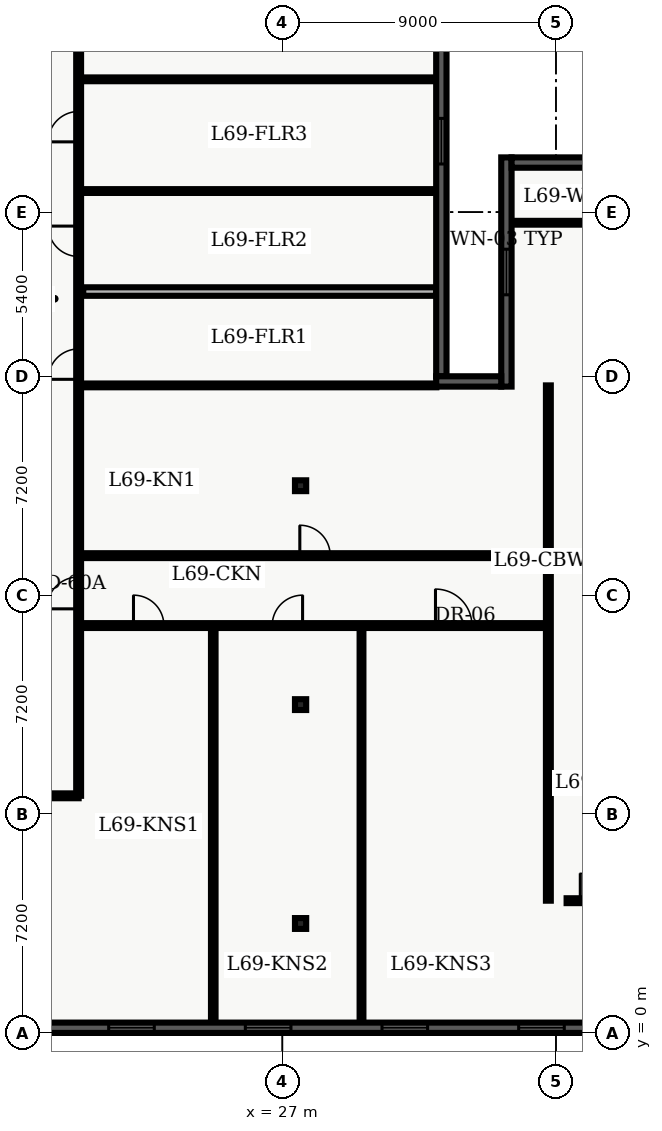
"""IFC4 building model, lengths in metres.
Left out: names, types, materials, properties, quantities, classifications, styles, units other than length and angle.
Written with IfcOpenShell. Run it as: python <this file> out.ifc"""

import sys

from ifc_helpers import new_model, entity, si_unit, converted_unit, direction, frame, origin_with_axes, origin_2d_with_axis, place, context, subcontext, project, spatial, polyline, rectangle, i_section, outline, extrude, element, fill, save


model = new_model("IFC4")
c1 = context("Model", 3, precision=1e-05, world=origin_with_axes(), true_north=direction((0.0, 1.0)))
c2 = subcontext(c1, "Body", "Model", "MODEL_VIEW")
j1 = project(units=[si_unit("LENGTHUNIT", "METRE"), converted_unit("PLANEANGLEUNIT", "DEGREE", entity("IfcPlaneAngleMeasure", 0.017), si_unit("PLANEANGLEUNIT", "RADIAN"), dimensions=[0, 0, 0, 0, 0, 0, 0])], contexts=[c1])
p1 = place(None, origin_with_axes())
s1 = spatial("IfcSite", under=j1, at=p1, CompositionType="ELEMENT")
p2 = place(p1, origin_with_axes())
s2 = spatial("IfcBuilding", under=s1, at=p2, CompositionType="ELEMENT")
p3 = place(p2, frame((0.0, 0.0, 280.2), z_axis=(0.0, 0.0, 1.0), x_axis=(1.0, 0.0, 0.0)))
s3 = spatial("IfcBuildingStorey", under=s2, at=p3, CompositionType="ELEMENT", Elevation=280.2)
for number, where, z_axis, x_axis in (
    (1, (27.6, 3.6, 0.0), (0.0, 0.0, 1.0), (1.0, 0.0, 0.0)),
    (2, (27.6, 10.8, 0.0), (0.0, 0.0, 1.0), (1.0, 0.0, 0.0)),
    (3, (27.6, 18.0, 0.0), (0.0, 0.0, 1.0), (1.0, 0.0, 0.0)),
):
    element("IfcColumn", number, at=place(p3, frame(where, z_axis=z_axis, x_axis=x_axis)), inside=s3, PredefinedType="COLUMN", context=c2, shape_type="SweptSolid", body=[
        extrude(i_section(OverallWidth=0.369, OverallDepth=0.356, WebThickness=0.011, FlangeThickness=0.018, FilletRadius=0.018, at=origin_2d_with_axis()), origin_with_axes(), (0.0, 0.0, 1.0), 3.9),
    ])
p4 = place(p3, frame((8.135, 7.8, 0.0), z_axis=(0.0, 0.0, 1.0), x_axis=(1.0, 0.0, 0.0)))
e4 = element("IfcWall", 4, at=p4, inside=s3, PredefinedType="PARTITIONING", context=c2, shape_type="SweptSolid", body=[
    extrude(outline(polyline([(0.0, -0.08), (12.165, -0.08), (12.165, 0.08), (0.0, 0.08), (0.0, -0.08)])), origin_with_axes(), (0.0, 0.0, 1.0), 2.7),
])
p5 = place(p4, frame((6.065, 0.0, 0.0), z_axis=(0.0, 0.0, 1.0), x_axis=(1.0, 0.0, 0.0)))
e5 = element("IfcOpeningElement", 5, at=p5, cuts=e4, PredefinedType="OPENING", context=c2, shape_type="SweptSolid", body=[
    extrude(rectangle(XDim=1.0, YDim=0.18, at=origin_2d_with_axis()), origin_with_axes(), (0.0, 0.0, 1.0), 2.15),
])
p6 = place(p3, frame((20.3, 7.8, 0.0), z_axis=(0.0, 0.0, 1.0), x_axis=(0.0, 1.0, 0.0)))
e6 = element("IfcWall", 6, at=p6, inside=s3, PredefinedType="PARTITIONING", context=c2, shape_type="SweptSolid", body=[
    extrude(outline(polyline([(0.0, -0.08), (32.7, -0.08), (32.7, 0.08), (0.0, 0.08), (0.0, -0.08)])), origin_with_axes(), (0.0, 0.0, 1.0), 2.7),
])
p7 = place(p6, frame((14.2, 0.0, 0.0), z_axis=(0.0, 0.0, 1.0), x_axis=(1.0, 0.0, 0.0)))
e7 = element("IfcOpeningElement", 7, at=p7, cuts=e6, PredefinedType="OPENING", context=c2, shape_type="SweptSolid", body=[
    extrude(rectangle(XDim=1.0, YDim=0.18, at=origin_2d_with_axis()), origin_with_axes(), (0.0, 0.0, 1.0), 2.15),
])
p8 = place(p6, frame((18.24, 0.0, 0.0), z_axis=(0.0, 0.0, 1.0), x_axis=(1.0, 0.0, 0.0)))
e8 = element("IfcOpeningElement", 8, at=p8, cuts=e6, PredefinedType="OPENING", context=c2, shape_type="SweptSolid", body=[
    extrude(rectangle(XDim=1.0, YDim=0.18, at=origin_2d_with_axis()), origin_with_axes(), (0.0, 0.0, 1.0), 2.15),
])
p9 = place(p6, frame((22.011, 0.0, 0.0), z_axis=(0.0, 0.0, 1.0), x_axis=(1.0, 0.0, 0.0)))
e9 = element("IfcOpeningElement", 9, at=p9, cuts=e6, PredefinedType="OPENING", context=c2, shape_type="SweptSolid", body=[
    extrude(rectangle(XDim=1.0, YDim=0.18, at=origin_2d_with_axis()), origin_with_axes(), (0.0, 0.0, 1.0), 2.15),
])
p10 = place(p6, frame((25.672, 0.0, 0.0), z_axis=(0.0, 0.0, 1.0), x_axis=(1.0, 0.0, 0.0)))
e10 = element("IfcOpeningElement", 10, at=p10, cuts=e6, PredefinedType="OPENING", context=c2, shape_type="SweptSolid", body=[
    extrude(rectangle(XDim=1.0, YDim=0.18, at=origin_2d_with_axis()), origin_with_axes(), (0.0, 0.0, 1.0), 2.15),
])
p11 = place(p6, frame((6.675, 0.0, 0.0), z_axis=(0.0, 0.0, 1.0), x_axis=(1.0, 0.0, 0.0)))
e11 = element("IfcOpeningElement", 11, at=p11, cuts=e6, PredefinedType="OPENING", context=c2, shape_type="SweptSolid", body=[
    extrude(rectangle(XDim=1.05, YDim=0.18, at=origin_2d_with_axis()), origin_with_axes(), (0.0, 0.0, 1.0), 2.15),
])
p12 = place(p3, frame((20.45, 24.387, 0.0), z_axis=(0.0, 0.0, 1.0), x_axis=(1.0, 0.0, 0.0)))
e12 = element("IfcWall", 12, at=p12, inside=s3, PredefinedType="PARTITIONING", context=c2, shape_type="SweptSolid", body=[
    extrude(outline(polyline([(0.0, -0.14), (11.615, -0.14), (11.615, 0.14), (0.0, 0.14), (0.0, -0.14)])), origin_with_axes(), (0.0, 0.0, 1.0), 2.7),
])
for number, where, z_axis, x_axis in (
    (13, (20.45, 27.693, 0.0), (0.0, 0.0, 1.0), (1.0, 0.0, 0.0)),
    (14, (20.45, 31.368, 0.0), (0.0, 0.0, 1.0), (1.0, 0.0, 0.0)),
):
    element("IfcWall", number, at=place(p3, frame(where, z_axis=z_axis, x_axis=x_axis)), inside=s3, PredefinedType="PARTITIONING", context=c2, shape_type="SweptSolid", body=[
        extrude(outline(polyline([(0.0, -0.062), (11.615, -0.062), (11.615, 0.062), (0.0, 0.062), (0.0, -0.062)])), origin_with_axes(), (0.0, 0.0, 1.0), 2.7),
    ])
p13 = place(p3, frame((20.3, 13.4, 0.0), z_axis=(0.0, 0.0, 1.0), x_axis=(1.0, 0.0, 0.0)))
e15 = element("IfcWall", 15, at=p13, inside=s3, PredefinedType="PARTITIONING", context=c2, shape_type="SweptSolid", body=[
    extrude(outline(polyline([(0.0, -0.08), (15.45, -0.08), (15.45, 0.08), (0.0, 0.08), (0.0, -0.08)])), origin_with_axes(), (0.0, 0.0, 1.0), 2.7),
])
p14 = place(p13, frame((2.304, 0.0, 0.0), z_axis=(0.0, 0.0, 1.0), x_axis=(1.0, 0.0, 0.0)))
e16 = element("IfcOpeningElement", 16, at=p14, cuts=e15, PredefinedType="OPENING", context=c2, shape_type="SweptSolid", body=[
    extrude(rectangle(XDim=1.0, YDim=0.18, at=origin_2d_with_axis()), origin_with_axes(), (0.0, 0.0, 1.0), 2.15),
])
p15 = place(p13, frame((6.866, 0.0, 0.0), z_axis=(0.0, 0.0, 1.0), x_axis=(1.0, 0.0, 0.0)))
e17 = element("IfcOpeningElement", 17, at=p15, cuts=e15, PredefinedType="OPENING", context=c2, shape_type="SweptSolid", body=[
    extrude(rectangle(XDim=1.0, YDim=0.18, at=origin_2d_with_axis()), origin_with_axes(), (0.0, 0.0, 1.0), 2.15),
])
p16 = place(p13, frame((12.337, 0.0, 0.0), z_axis=(0.0, 0.0, 1.0), x_axis=(1.0, 0.0, 0.0)))
e18 = element("IfcOpeningElement", 18, at=p16, cuts=e15, PredefinedType="OPENING", context=c2, shape_type="SweptSolid", body=[
    extrude(rectangle(XDim=1.2, YDim=0.18, at=origin_2d_with_axis()), origin_with_axes(), (0.0, 0.0, 1.0), 2.2),
])
p17 = place(p3, frame((20.3, 15.7, 0.0), z_axis=(0.0, 0.0, 1.0), x_axis=(1.0, 0.0, 0.0)))
e19 = element("IfcWall", 19, at=p17, inside=s3, PredefinedType="PARTITIONING", context=c2, shape_type="SweptSolid", body=[
    extrude(outline(polyline([(0.0, -0.08), (15.45, -0.08), (15.45, 0.08), (0.0, 0.08), (0.0, -0.08)])), origin_with_axes(), (0.0, 0.0, 1.0), 2.7),
])
p18 = place(p17, frame((7.775, 0.0, 0.0), z_axis=(0.0, 0.0, 1.0), x_axis=(1.0, 0.0, 0.0)))
e20 = element("IfcOpeningElement", 20, at=p18, cuts=e19, PredefinedType="OPENING", context=c2, shape_type="SweptSolid", body=[
    extrude(rectangle(XDim=1.0, YDim=0.18, at=origin_2d_with_axis()), origin_with_axes(), (0.0, 0.0, 1.0), 2.15),
])
p19 = place(p3, frame((35.75, 4.35, 0.0), z_axis=(0.0, 0.0, 1.0), x_axis=(0.0, 1.0, 0.0)))
e21 = element("IfcWall", 21, at=p19, inside=s3, PredefinedType="PARTITIONING", context=c2, shape_type="SweptSolid", body=[
    extrude(outline(polyline([(0.0, -0.08), (16.95, -0.08), (16.95, 0.08), (0.0, 0.08), (0.0, -0.08)])), origin_with_axes(), (0.0, 0.0, 1.0), 2.7),
])
p20 = place(p3, frame((24.728, 0.335, 0.0), z_axis=(0.0, 0.0, 1.0), x_axis=(0.0, 1.0, 0.0)))
e22 = element("IfcWall", 22, at=p20, inside=s3, PredefinedType="PARTITIONING", context=c2, shape_type="SweptSolid", body=[
    extrude(outline(polyline([(0.0, -0.075), (12.945, -0.075), (12.945, 0.075), (0.0, 0.075), (0.0, -0.075)])), origin_with_axes(), (0.0, 0.0, 1.0), 2.7),
])
p21 = place(p3, frame((29.604, 0.335, 0.0), z_axis=(0.0, 0.0, 1.0), x_axis=(0.0, 1.0, 0.0)))
e23 = element("IfcWall", 23, at=p21, inside=s3, PredefinedType="PARTITIONING", context=c2, shape_type="SweptSolid", body=[
    extrude(outline(polyline([(0.0, -0.062), (12.945, -0.062), (12.945, 0.062), (0.0, 0.062), (0.0, -0.062)])), origin_with_axes(), (0.0, 0.0, 1.0), 2.7),
])
p22 = place(p3, frame((34.535, 26.65, 0.0), z_axis=(0.0, 0.0, 1.0), x_axis=(1.0, 0.0, 0.0)))
e24 = element("IfcWall", 24, at=p22, inside=s3, PredefinedType="PARTITIONING", context=c2, shape_type="SweptSolid", body=[
    extrude(outline(polyline([(0.0, -0.062), (12.995, -0.062), (12.995, 0.062), (0.0, 0.062), (0.0, -0.062)])), origin_with_axes(), (0.0, 0.0, 1.0), 2.7),
])
p23 = place(p22, frame((8.465, 0.0, 0.0), z_axis=(0.0, 0.0, 1.0), x_axis=(1.0, 0.0, 0.0)))
e25 = element("IfcOpeningElement", 25, at=p23, cuts=e24, PredefinedType="OPENING", context=c2, shape_type="SweptSolid", body=[
    extrude(rectangle(XDim=1.0, YDim=0.145, at=origin_2d_with_axis()), origin_with_axes(), (0.0, 0.0, 1.0), 2.15),
])
p24 = place(p3, frame((20.3, 21.3, 0.0), z_axis=(0.0, 0.0, 1.0), x_axis=(1.0, 0.0, 0.0)))
e26 = element("IfcWall", 26, at=p24, inside=s3, PredefinedType="PARTITIONING", context=c2, shape_type="SweptSolid", body=[
    extrude(outline(polyline([(0.0, -0.062), (11.765, -0.062), (11.765, 0.062), (0.0, 0.062), (0.0, -0.062)])), origin_with_axes(), (0.0, 0.0, 1.0), 2.7),
])
p25 = place(p3, frame((36.35, 4.35, 0.0), z_axis=(0.0, 0.0, 1.0), x_axis=(1.0, 0.0, 0.0)))
e27 = element("IfcWall", 27, at=p25, inside=s3, PredefinedType="PARTITIONING", context=c2, shape_type="SweptSolid", body=[
    extrude(outline(polyline([(0.0, -0.08), (3.725, -0.08), (3.725, 0.08), (0.0, 0.08), (0.0, -0.08)])), origin_with_axes(), (0.0, 0.0, 1.0), 2.7),
])
p26 = place(p25, frame((0.9, 0.0, 0.0), z_axis=(0.0, 0.0, 1.0), x_axis=(1.0, 0.0, 0.0)))
e28 = element("IfcOpeningElement", 28, at=p26, cuts=e27, PredefinedType="OPENING", context=c2, shape_type="SweptSolid", body=[
    extrude(rectangle(XDim=0.9, YDim=0.18, at=origin_2d_with_axis()), origin_with_axes(), (0.0, 0.0, 1.0), 2.15),
])
p27 = place(p3, frame((34.37, 21.26, 0.0), z_axis=(0.0, 0.0, 1.0), x_axis=(0.0, 1.0, 0.0)))
e29 = element("IfcWall", 29, at=p27, inside=s3, PredefinedType="SOLIDWALL", context=c2, shape_type="SweptSolid", body=[
    extrude(outline(polyline([(0.0, -0.17), (7.54, -0.17), (7.54, 0.17), (0.0, 0.17), (0.0, -0.17)])), origin_with_axes(), (0.0, 0.0, 1.0), 3.66),
])
p28 = place(p27, frame((3.77, 0.0, 0.45), z_axis=(0.0, 0.0, 1.0), x_axis=(1.0, 0.0, 0.0)))
e30 = element("IfcOpeningElement", 30, at=p28, cuts=e29, PredefinedType="OPENING", context=c2, shape_type="SweptSolid", body=[
    extrude(rectangle(XDim=1.5, YDim=0.36, at=origin_2d_with_axis()), origin_with_axes(), (0.0, 0.0, 1.0), 2.1),
])
p29 = place(p3, frame((34.54, 28.63, 0.0), z_axis=(0.0, 0.0, 1.0), x_axis=(1.0, 0.0, 0.0)))
e31 = element("IfcWall", 31, at=p29, inside=s3, PredefinedType="SOLIDWALL", context=c2, shape_type="SweptSolid", body=[
    extrude(outline(polyline([(0.0, -0.17), (13.16, -0.17), (13.16, 0.17), (0.0, 0.17), (0.0, -0.17)])), origin_with_axes(), (0.0, 0.0, 1.0), 3.66),
])
p30 = place(p29, frame((3.59, 0.0, 0.45), z_axis=(0.0, 0.0, 1.0), x_axis=(1.0, 0.0, 0.0)))
e32 = element("IfcOpeningElement", 32, at=p30, cuts=e31, PredefinedType="OPENING", context=c2, shape_type="SweptSolid", body=[
    extrude(rectangle(XDim=1.5, YDim=0.36, at=origin_2d_with_axis()), origin_with_axes(), (0.0, 0.0, 1.0), 2.1),
])
p31 = place(p29, frame((9.57, 0.0, 0.45), z_axis=(0.0, 0.0, 1.0), x_axis=(1.0, 0.0, 0.0)))
e33 = element("IfcOpeningElement", 33, at=p31, cuts=e31, PredefinedType="OPENING", context=c2, shape_type="SweptSolid", body=[
    extrude(rectangle(XDim=1.5, YDim=0.36, at=origin_2d_with_axis()), origin_with_axes(), (0.0, 0.0, 1.0), 2.1),
])
p32 = place(p3, frame((47.36, 0.17, 0.0), z_axis=(0.0, 0.0, 1.0), x_axis=(-1.0, 0.0, 0.0)))
e34 = element("IfcWall", 34, at=p32, inside=s3, PredefinedType="SOLIDWALL", context=c2, shape_type="SweptSolid", body=[
    extrude(outline(polyline([(0.0, -0.17), (37.16, -0.17), (37.16, 0.17), (0.0, 0.17), (0.0, -0.17)])), origin_with_axes(), (0.0, 0.0, 1.0), 3.66),
])
p33 = place(p32, frame((2.847, 0.0, 0.45), z_axis=(0.0, 0.0, 1.0), x_axis=(1.0, 0.0, 0.0)))
e35 = element("IfcOpeningElement", 35, at=p33, cuts=e34, PredefinedType="OPENING", context=c2, shape_type="SweptSolid", body=[
    extrude(rectangle(XDim=1.5, YDim=0.36, at=origin_2d_with_axis()), origin_with_axes(), (0.0, 0.0, 1.0), 2.1),
])
p34 = place(p32, frame((7.342, 0.0, 0.45), z_axis=(0.0, 0.0, 1.0), x_axis=(1.0, 0.0, 0.0)))
e36 = element("IfcOpeningElement", 36, at=p34, cuts=e34, PredefinedType="OPENING", context=c2, shape_type="SweptSolid", body=[
    extrude(rectangle(XDim=1.5, YDim=0.36, at=origin_2d_with_axis()), origin_with_axes(), (0.0, 0.0, 1.0), 2.1),
])
p35 = place(p32, frame((11.837, 0.0, 0.45), z_axis=(0.0, 0.0, 1.0), x_axis=(1.0, 0.0, 0.0)))
e37 = element("IfcOpeningElement", 37, at=p35, cuts=e34, PredefinedType="OPENING", context=c2, shape_type="SweptSolid", body=[
    extrude(rectangle(XDim=1.5, YDim=0.36, at=origin_2d_with_axis()), origin_with_axes(), (0.0, 0.0, 1.0), 2.1),
])
p36 = place(p32, frame((16.332, 0.0, 0.45), z_axis=(0.0, 0.0, 1.0), x_axis=(1.0, 0.0, 0.0)))
e38 = element("IfcOpeningElement", 38, at=p36, cuts=e34, PredefinedType="OPENING", context=c2, shape_type="SweptSolid", body=[
    extrude(rectangle(XDim=1.5, YDim=0.36, at=origin_2d_with_axis()), origin_with_axes(), (0.0, 0.0, 1.0), 2.1),
])
p37 = place(p32, frame((20.827, 0.0, 0.45), z_axis=(0.0, 0.0, 1.0), x_axis=(1.0, 0.0, 0.0)))
e39 = element("IfcOpeningElement", 39, at=p37, cuts=e34, PredefinedType="OPENING", context=c2, shape_type="SweptSolid", body=[
    extrude(rectangle(XDim=1.5, YDim=0.36, at=origin_2d_with_axis()), origin_with_axes(), (0.0, 0.0, 1.0), 2.1),
])
p38 = place(p32, frame((25.322, 0.0, 0.45), z_axis=(0.0, 0.0, 1.0), x_axis=(1.0, 0.0, 0.0)))
e40 = element("IfcOpeningElement", 40, at=p38, cuts=e34, PredefinedType="OPENING", context=c2, shape_type="SweptSolid", body=[
    extrude(rectangle(XDim=1.5, YDim=0.36, at=origin_2d_with_axis()), origin_with_axes(), (0.0, 0.0, 1.0), 2.1),
])
p39 = place(p32, frame((29.817, 0.0, 0.45), z_axis=(0.0, 0.0, 1.0), x_axis=(1.0, 0.0, 0.0)))
e41 = element("IfcOpeningElement", 41, at=p39, cuts=e34, PredefinedType="OPENING", context=c2, shape_type="SweptSolid", body=[
    extrude(rectangle(XDim=1.5, YDim=0.36, at=origin_2d_with_axis()), origin_with_axes(), (0.0, 0.0, 1.0), 2.1),
])
p40 = place(p32, frame((34.312, 0.0, 0.45), z_axis=(0.0, 0.0, 1.0), x_axis=(1.0, 0.0, 0.0)))
e42 = element("IfcOpeningElement", 42, at=p40, cuts=e34, PredefinedType="OPENING", context=c2, shape_type="SweptSolid", body=[
    extrude(rectangle(XDim=1.5, YDim=0.36, at=origin_2d_with_axis()), origin_with_axes(), (0.0, 0.0, 1.0), 2.1),
])
p41 = place(p3, frame((32.23, 41.82, 0.0), z_axis=(0.0, 0.0, 1.0), x_axis=(0.0, -1.0, 0.0)))
e43 = element("IfcWall", 43, at=p41, inside=s3, PredefinedType="SOLIDWALL", context=c2, shape_type="SweptSolid", body=[
    extrude(outline(polyline([(0.0, -0.17), (20.22, -0.17), (20.22, 0.17), (0.0, 0.17), (0.0, -0.17)])), origin_with_axes(), (0.0, 0.0, 1.0), 3.66),
])
p42 = place(p41, frame((2.978, 0.0, 0.45), z_axis=(0.0, 0.0, 1.0), x_axis=(1.0, 0.0, 0.0)))
e44 = element("IfcOpeningElement", 44, at=p42, cuts=e43, PredefinedType="OPENING", context=c2, shape_type="SweptSolid", body=[
    extrude(rectangle(XDim=1.5, YDim=0.36, at=origin_2d_with_axis()), origin_with_axes(), (0.0, 0.0, 1.0), 2.1),
])
p43 = place(p41, frame((7.732, 0.0, 0.45), z_axis=(0.0, 0.0, 1.0), x_axis=(1.0, 0.0, 0.0)))
e45 = element("IfcOpeningElement", 45, at=p43, cuts=e43, PredefinedType="OPENING", context=c2, shape_type="SweptSolid", body=[
    extrude(rectangle(XDim=1.5, YDim=0.36, at=origin_2d_with_axis()), origin_with_axes(), (0.0, 0.0, 1.0), 2.1),
])
p44 = place(p41, frame((12.487, 0.0, 0.45), z_axis=(0.0, 0.0, 1.0), x_axis=(1.0, 0.0, 0.0)))
e46 = element("IfcOpeningElement", 46, at=p44, cuts=e43, PredefinedType="OPENING", context=c2, shape_type="SweptSolid", body=[
    extrude(rectangle(XDim=1.5, YDim=0.36, at=origin_2d_with_axis()), origin_with_axes(), (0.0, 0.0, 1.0), 2.1),
])
p45 = place(p3, frame((32.06, 21.43, 0.0), z_axis=(0.0, 0.0, 1.0), x_axis=(1.0, 0.0, 0.0)))
e47 = element("IfcWall", 47, at=p45, inside=s3, PredefinedType="SOLIDWALL", context=c2, shape_type="SweptSolid", body=[
    extrude(outline(polyline([(0.0, -0.17), (2.14, -0.17), (2.14, 0.17), (0.0, 0.17), (0.0, -0.17)])), origin_with_axes(), (0.0, 0.0, 1.0), 3.66),
])
p46 = place(p6, frame((14.2, 0.0, 0.0), z_axis=(0.0, 0.0, 1.0), x_axis=(1.0, 0.0, 0.0)))
e48 = element("IfcDoor", 48, at=p46, inside=s3, OperationType="SINGLE_SWING_LEFT", PredefinedType="DOOR", context=c2, shape_type="SweptSolid", body=[
    extrude(rectangle(XDim=1.0, YDim=0.09, at=origin_2d_with_axis()), origin_with_axes(), (0.0, 0.0, 1.0), 2.15),
])
fill(e7, e48)
p47 = place(p6, frame((18.24, 0.0, 0.0), z_axis=(0.0, 0.0, 1.0), x_axis=(1.0, 0.0, 0.0)))
e49 = element("IfcDoor", 49, at=p47, inside=s3, OperationType="SINGLE_SWING_RIGHT", PredefinedType="DOOR", context=c2, shape_type="SweptSolid", body=[
    extrude(rectangle(XDim=1.0, YDim=0.09, at=origin_2d_with_axis()), origin_with_axes(), (0.0, 0.0, 1.0), 2.15),
])
fill(e8, e49)
p48 = place(p6, frame((22.011, 0.0, 0.0), z_axis=(0.0, 0.0, 1.0), x_axis=(1.0, 0.0, 0.0)))
e50 = element("IfcDoor", 50, at=p48, inside=s3, OperationType="SINGLE_SWING_LEFT", PredefinedType="DOOR", context=c2, shape_type="SweptSolid", body=[
    extrude(rectangle(XDim=1.0, YDim=0.09, at=origin_2d_with_axis()), origin_with_axes(), (0.0, 0.0, 1.0), 2.15),
])
fill(e9, e50)
p49 = place(p6, frame((6.675, 0.0, 0.0), z_axis=(0.0, 0.0, 1.0), x_axis=(1.0, 0.0, 0.0)))
e51 = element("IfcDoor", 51, at=p49, inside=s3, OperationType="SINGLE_SWING_LEFT", PredefinedType="DOOR", context=c2, shape_type="SweptSolid", body=[
    extrude(rectangle(XDim=1.05, YDim=0.09, at=origin_2d_with_axis()), origin_with_axes(), (0.0, 0.0, 1.0), 2.15),
])
fill(e11, e51)
p50 = place(p13, frame((2.304, 0.0, 0.0), z_axis=(0.0, 0.0, 1.0), x_axis=(1.0, 0.0, 0.0)))
e52 = element("IfcDoor", 52, at=p50, inside=s3, OperationType="SINGLE_SWING_LEFT", PredefinedType="DOOR", context=c2, shape_type="SweptSolid", body=[
    extrude(rectangle(XDim=1.0, YDim=0.09, at=origin_2d_with_axis()), origin_with_axes(), (0.0, 0.0, 1.0), 2.15),
])
fill(e16, e52)
p51 = place(p13, frame((6.866, 0.0, 0.0), z_axis=(0.0, 0.0, 1.0), x_axis=(1.0, 0.0, 0.0)))
e53 = element("IfcDoor", 53, at=p51, inside=s3, OperationType="SINGLE_SWING_RIGHT", PredefinedType="DOOR", context=c2, shape_type="SweptSolid", body=[
    extrude(rectangle(XDim=1.0, YDim=0.09, at=origin_2d_with_axis()), origin_with_axes(), (0.0, 0.0, 1.0), 2.15),
])
fill(e17, e53)
p52 = place(p13, frame((12.337, 0.0, 0.0), z_axis=(0.0, 0.0, 1.0), x_axis=(1.0, 0.0, 0.0)))
e54 = element("IfcDoor", 54, at=p52, inside=s3, OperationType="SINGLE_SWING_LEFT", PredefinedType="DOOR", context=c2, shape_type="SweptSolid", body=[
    extrude(rectangle(XDim=1.2, YDim=0.09, at=origin_2d_with_axis()), origin_with_axes(), (0.0, 0.0, 1.0), 2.2),
])
fill(e18, e54)
p53 = place(p17, frame((7.775, 0.0, 0.0), z_axis=(0.0, 0.0, 1.0), x_axis=(1.0, 0.0, 0.0)))
e55 = element("IfcDoor", 55, at=p53, inside=s3, OperationType="SINGLE_SWING_LEFT", PredefinedType="DOOR", context=c2, shape_type="SweptSolid", body=[
    extrude(rectangle(XDim=1.0, YDim=0.09, at=origin_2d_with_axis()), origin_with_axes(), (0.0, 0.0, 1.0), 2.15),
])
fill(e20, e55)
p54 = place(p25, frame((0.9, 0.0, 0.0), z_axis=(0.0, 0.0, 1.0), x_axis=(1.0, 0.0, 0.0)))
e56 = element("IfcDoor", 56, at=p54, inside=s3, OperationType="SINGLE_SWING_LEFT", PredefinedType="DOOR", context=c2, shape_type="SweptSolid", body=[
    extrude(rectangle(XDim=0.9, YDim=0.09, at=origin_2d_with_axis()), origin_with_axes(), (0.0, 0.0, 1.0), 2.15),
])
fill(e28, e56)
p55 = place(p27, frame((3.77, 0.0, 0.45), z_axis=(0.0, 0.0, 1.0), x_axis=(1.0, 0.0, 0.0)))
e57 = element("IfcWindow", 57, at=p55, inside=s3, PredefinedType="WINDOW", context=c2, shape_type="SweptSolid", body=[
    extrude(rectangle(XDim=1.5, YDim=0.09, at=origin_2d_with_axis()), origin_with_axes(), (0.0, 0.0, 1.0), 2.1),
])
fill(e30, e57)
p56 = place(p32, frame((11.837, 0.0, 0.45), z_axis=(0.0, 0.0, 1.0), x_axis=(1.0, 0.0, 0.0)))
e58 = element("IfcWindow", 58, at=p56, inside=s3, PredefinedType="WINDOW", context=c2, shape_type="SweptSolid", body=[
    extrude(rectangle(XDim=1.5, YDim=0.09, at=origin_2d_with_axis()), origin_with_axes(), (0.0, 0.0, 1.0), 2.1),
])
fill(e37, e58)
p57 = place(p32, frame((16.332, 0.0, 0.45), z_axis=(0.0, 0.0, 1.0), x_axis=(1.0, 0.0, 0.0)))
e59 = element("IfcWindow", 59, at=p57, inside=s3, PredefinedType="WINDOW", context=c2, shape_type="SweptSolid", body=[
    extrude(rectangle(XDim=1.5, YDim=0.09, at=origin_2d_with_axis()), origin_with_axes(), (0.0, 0.0, 1.0), 2.1),
])
fill(e38, e59)
p58 = place(p32, frame((20.827, 0.0, 0.45), z_axis=(0.0, 0.0, 1.0), x_axis=(1.0, 0.0, 0.0)))
e60 = element("IfcWindow", 60, at=p58, inside=s3, PredefinedType="WINDOW", context=c2, shape_type="SweptSolid", body=[
    extrude(rectangle(XDim=1.5, YDim=0.09, at=origin_2d_with_axis()), origin_with_axes(), (0.0, 0.0, 1.0), 2.1),
])
fill(e39, e60)
p59 = place(p32, frame((25.322, 0.0, 0.45), z_axis=(0.0, 0.0, 1.0), x_axis=(1.0, 0.0, 0.0)))
e61 = element("IfcWindow", 61, at=p59, inside=s3, PredefinedType="WINDOW", context=c2, shape_type="SweptSolid", body=[
    extrude(rectangle(XDim=1.5, YDim=0.09, at=origin_2d_with_axis()), origin_with_axes(), (0.0, 0.0, 1.0), 2.1),
])
fill(e40, e61)
p60 = place(p41, frame((12.487, 0.0, 0.45), z_axis=(0.0, 0.0, 1.0), x_axis=(1.0, 0.0, 0.0)))
e62 = element("IfcWindow", 62, at=p60, inside=s3, PredefinedType="WINDOW", context=c2, shape_type="SweptSolid", body=[
    extrude(rectangle(XDim=1.5, YDim=0.09, at=origin_2d_with_axis()), origin_with_axes(), (0.0, 0.0, 1.0), 2.1),
])
fill(e46, e62)
save(model, sys.argv[1])
